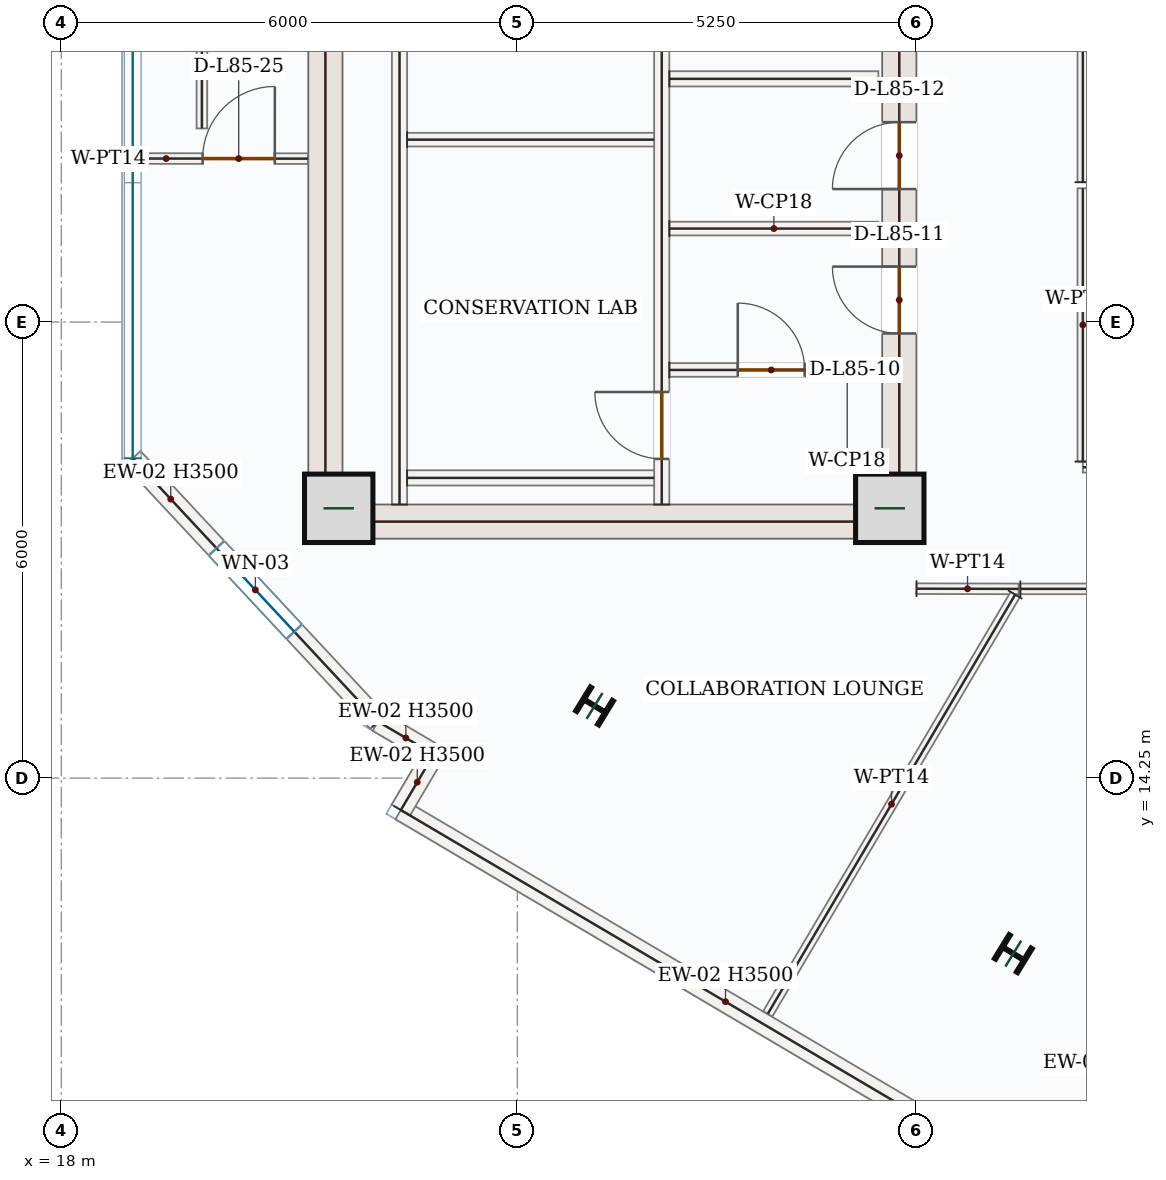
"""IFC4 building model, lengths in metres.
Left out: names, types, materials, properties, quantities, classifications, styles, units other than length and angle.
Written with IfcOpenShell. Run it as: python <this file> out.ifc"""

import sys

from ifc_helpers import new_model, si_unit, direction, frame, frame_2d, origin, origin_2d, place, context, subcontext, project, spatial, rectangle, i_section, extrude, source, transform, mapped, element, fill, save


model = new_model("IFC4")
c1 = context("Model", 3, precision=1e-05, world=origin(), true_north=direction((0.0, 1.0)))
c2 = subcontext(c1, "Body", "Model", "MODEL_VIEW")
j1 = project(units=[si_unit("LENGTHUNIT", "METRE"), si_unit("PLANEANGLEUNIT", "RADIAN")], contexts=[c1])
p1 = place(None, origin())
s1 = spatial("IfcSite", under=j1, at=p1, CompositionType="ELEMENT")
p2 = place(p1, origin())
s2 = spatial("IfcBuilding", under=s1, at=p2, CompositionType="ELEMENT")
p3 = place(p2, frame((0.0, 0.0, 349.8)))
s3 = spatial("IfcBuildingStorey", under=s2, at=p3, CompositionType="ELEMENT", Elevation=349.8)
m1 = source(origin(), c2, "Body", "SweptSolid", [
    extrude(rectangle(XDim=8.55, YDim=0.45, at=frame_2d((4.275, 0.0))), origin(), (0.0, 0.0, 1.0), 3.5),
])
p4 = place(p3, frame((21.475, 17.4, 0.0), z_axis=(0.0, 0.0, 1.0), x_axis=(0.0, 1.0, 0.0)))
e1 = element("IfcWall", 1, at=p4, inside=s3, PredefinedType="SHEAR", context=c2, shape_type="MappedRepresentation", body=[
    mapped(m1, transform((0.0, 0.0, 0.0), x_axis=(1.0, 0.0, 0.0), y_axis=(0.0, 1.0, 0.0), z_axis=(0.0, 0.0, 1.0), scale=1.0)),
])
p5 = place(p3, frame((29.025, 17.4, 0.0), z_axis=(0.0, 0.0, 1.0), x_axis=(0.0, 1.0, 0.0)))
e2 = element("IfcWall", 2, at=p5, inside=s3, PredefinedType="SHEAR", context=c2, shape_type="SweptSolid", body=[
    extrude(rectangle(XDim=8.55, YDim=0.45, at=frame_2d((4.275, 0.0))), origin(), (0.0, 0.0, 1.0), 3.5),
])
p6 = place(p5, frame((6.65, 0.0, 0.0)))
e3 = element("IfcOpeningElement", 3, at=p6, cuts=e2, PredefinedType="OPENING", context=c2, shape_type="SweptSolid", body=[
    extrude(rectangle(XDim=1.1, YDim=2.2, at=frame_2d((0.55, 1.1))), frame((0.0, 0.235, 0.0), z_axis=(0.0, -1.0, 0.0), x_axis=(1.0, 0.0, 0.0)), (0.0, 0.0, 1.0), 0.47),
])
p7 = place(p5, frame((2.7, 0.0, 0.0)))
e4 = element("IfcOpeningElement", 4, at=p7, cuts=e2, PredefinedType="OPENING", context=c2, shape_type="SweptSolid", body=[
    extrude(rectangle(XDim=0.88, YDim=2.1, at=frame_2d((0.44, 1.05))), frame((0.0, 0.235, 0.0), z_axis=(0.0, -1.0, 0.0), x_axis=(1.0, 0.0, 0.0)), (0.0, 0.0, 1.0), 0.47),
])
p8 = place(p5, frame((4.6, 0.0, 0.0)))
e5 = element("IfcOpeningElement", 5, at=p8, cuts=e2, PredefinedType="OPENING", context=c2, shape_type="SweptSolid", body=[
    extrude(rectangle(XDim=0.88, YDim=2.1, at=frame_2d((0.44, 1.05))), frame((0.0, 0.235, 0.0), z_axis=(0.0, -1.0, 0.0), x_axis=(1.0, 0.0, 0.0)), (0.0, 0.0, 1.0), 0.47),
])
m2 = source(origin(), c2, "Body", "SweptSolid", [
    extrude(rectangle(XDim=7.1, YDim=0.45, at=frame_2d((3.55, 0.0))), origin(), (0.0, 0.0, 1.0), 3.5),
])
p9 = place(p3, frame((21.7, 17.625, 0.0), z_axis=(0.0, 0.0, 1.0), x_axis=(1.0, 0.0, 0.0)))
e6 = element("IfcWall", 6, at=p9, inside=s3, PredefinedType="SHEAR", context=c2, shape_type="MappedRepresentation", body=[
    mapped(m2, transform((0.0, 0.0, 0.0), x_axis=(1.0, 0.0, 0.0), y_axis=(0.0, 1.0, 0.0), z_axis=(0.0, 0.0, 1.0), scale=1.0)),
])
m3 = source(origin(), c2, "Body", "SweptSolid", [
    extrude(rectangle(XDim=0.9, YDim=0.9, at=origin_2d()), origin(), (0.0, 0.0, 1.0), 3.75),
])
for number, where, z_axis, x_axis in (
    (7, (21.65, 17.8, 0.0), (0.0, 0.0, 1.0), (1.0, 0.0, 0.0)),
    (8, (28.9, 17.8, 0.0), (0.0, 0.0, 1.0), (1.0, 0.0, 0.0)),
):
    element("IfcColumn", number, at=place(p3, frame(where, z_axis=z_axis, x_axis=x_axis)), inside=s3, PredefinedType="COLUMN", context=c2, shape_type="MappedRepresentation", body=[
        mapped(m3, transform((0.0, 0.0, 0.0), x_axis=(1.0, 0.0, 0.0), y_axis=(0.0, 1.0, 0.0), z_axis=(0.0, 0.0, 1.0), scale=1.0)),
    ])
m4 = source(origin(), c2, "Body", "SweptSolid", [
    extrude(i_section(OverallWidth=0.369, OverallDepth=0.356, WebThickness=0.011, FlangeThickness=0.018, FilletRadius=0.018, at=origin_2d()), origin(), (0.0, 0.0, 1.0), 3.75),
])
for number, where, z_axis, x_axis in (
    (9, (25.016, 15.2, 0.0), (0.0, 0.0, 1.0), (0.522, 0.853, 0.0)),
    (10, (30.525, 11.942, 0.0), (0.0, 0.0, 1.0), (0.522, 0.853, 0.0)),
):
    element("IfcColumn", number, at=place(p3, frame(where, z_axis=z_axis, x_axis=x_axis)), inside=s3, PredefinedType="COLUMN", context=c2, shape_type="MappedRepresentation", body=[
        mapped(m4, transform((0.0, 0.0, 0.0), x_axis=(1.0, 0.0, 0.0), y_axis=(0.0, 1.0, 0.0), z_axis=(0.0, 0.0, 1.0), scale=1.0)),
    ])
m5 = source(origin(), c2, "Body", "SweptSolid", [
    extrude(rectangle(XDim=9.92, YDim=0.28, at=frame_2d((4.96, 0.0))), origin(), (0.0, 0.0, 1.0), 3.5),
])
p10 = place(p3, frame((31.01, 8.788, 0.0), z_axis=(0.0, 0.0, 1.0), x_axis=(-0.861192451778, 0.508279018848, 0.0)))
e11 = element("IfcWall", 11, at=p10, inside=s3, PredefinedType="SOLIDWALL", context=c2, shape_type="MappedRepresentation", body=[
    mapped(m5, transform((0.0, 0.0, 0.0), x_axis=(1.0, 0.0, 0.0), y_axis=(0.0, 1.0, 0.0), z_axis=(0.0, 0.0, 1.0), scale=1.0)),
])
m6 = source(origin(), c2, "Body", "SweptSolid", [
    extrude(rectangle(XDim=0.85, YDim=0.28, at=frame_2d((0.425, 0.0))), origin(), (0.0, 0.0, 1.0), 3.5),
])
for number, where, z_axis, x_axis in (
    (12, (22.467, 13.83, 0.0), (0.0, 0.0, 1.0), (0.508, 0.861, 0.0)),
    (13, (22.899, 14.562, 0.0), (0.0, 0.0, 1.0), (-0.861, 0.508, 0.0)),
):
    element("IfcWall", number, at=place(p3, frame(where, z_axis=z_axis, x_axis=x_axis)), inside=s3, PredefinedType="SOLIDWALL", context=c2, shape_type="MappedRepresentation", body=[
        mapped(m6, transform((0.0, 0.0, 0.0), x_axis=(1.0, 0.0, 0.0), y_axis=(0.0, 1.0, 0.0), z_axis=(0.0, 0.0, 1.0), scale=1.0)),
    ])
p11 = place(p3, frame((22.167, 14.994, 0.0), z_axis=(0.0, 0.0, 1.0), x_axis=(-0.681733754317, 0.731600361006, 0.0)))
e14 = element("IfcWall", 14, at=p11, inside=s3, PredefinedType="SOLIDWALL", context=c2, shape_type="SweptSolid", body=[
    extrude(rectangle(XDim=4.734, YDim=0.28, at=frame_2d((2.367, 0.0))), origin(), (0.0, 0.0, 1.0), 3.5),
])
p12 = place(p11, frame((1.617, 0.0, 0.85)))
e15 = element("IfcOpeningElement", 15, at=p12, cuts=e14, PredefinedType="OPENING", context=c2, shape_type="SweptSolid", body=[
    extrude(rectangle(XDim=1.5, YDim=1.5, at=frame_2d((0.75, 0.75))), frame((0.0, 0.15, 0.0), z_axis=(0.0, -1.0, 0.0), x_axis=(1.0, 0.0, 0.0)), (0.0, 0.0, 1.0), 0.3),
])
m7 = source(origin(), c2, "Body", "SweptSolid", [
    extrude(rectangle(XDim=7.87, YDim=0.2, at=frame_2d((3.935, 0.0))), origin(), (0.0, 0.0, 1.0), 3.5),
])
p13 = place(p3, frame((22.45, 17.85, 0.0), z_axis=(0.0, 0.0, 1.0), x_axis=(0.0, 1.0, 0.0)))
e16 = element("IfcWall", 16, at=p13, inside=s3, PredefinedType="SOLIDWALL", context=c2, shape_type="MappedRepresentation", body=[
    mapped(m7, transform((0.0, 0.0, 0.0), x_axis=(1.0, 0.0, 0.0), y_axis=(0.0, 1.0, 0.0), z_axis=(0.0, 0.0, 1.0), scale=1.0)),
])
p14 = place(p3, frame((25.9, 17.85, 0.0), z_axis=(0.0, 0.0, 1.0), x_axis=(0.0, 1.0, 0.0)))
e17 = element("IfcWall", 17, at=p14, inside=s3, PredefinedType="SOLIDWALL", context=c2, shape_type="SweptSolid", body=[
    extrude(rectangle(XDim=8.0, YDim=0.2, at=frame_2d((4.0, 0.0))), origin(), (0.0, 0.0, 1.0), 3.5),
])
p15 = place(p14, frame((6.2, 0.0, 0.0)))
e18 = element("IfcOpeningElement", 18, at=p15, cuts=e17, PredefinedType="OPENING", context=c2, shape_type="SweptSolid", body=[
    extrude(rectangle(XDim=1.0, YDim=2.15, at=frame_2d((0.5, 1.075))), frame((0.0, 0.11, 0.0), z_axis=(0.0, -1.0, 0.0), x_axis=(1.0, 0.0, 0.0)), (0.0, 0.0, 1.0), 0.22),
])
p16 = place(p14, frame((0.6, 0.0, 0.0)))
e19 = element("IfcOpeningElement", 19, at=p16, cuts=e17, PredefinedType="OPENING", context=c2, shape_type="SweptSolid", body=[
    extrude(rectangle(XDim=0.88, YDim=2.1, at=frame_2d((0.44, 1.05))), frame((0.0, 0.11, 0.0), z_axis=(0.0, -1.0, 0.0), x_axis=(1.0, 0.0, 0.0)), (0.0, 0.0, 1.0), 0.22),
])
m8 = source(origin(), c2, "Body", "SweptSolid", [
    extrude(rectangle(XDim=3.25, YDim=0.2, at=frame_2d((1.625, 0.0))), origin(), (0.0, 0.0, 1.0), 3.5),
])
p17 = place(p3, frame((22.55, 18.2, 0.0), z_axis=(0.0, 0.0, 1.0), x_axis=(1.0, 0.0, 0.0)))
e20 = element("IfcWall", 20, at=p17, inside=s3, PredefinedType="SOLIDWALL", context=c2, shape_type="MappedRepresentation", body=[
    mapped(m8, transform((0.0, 0.0, 0.0), x_axis=(1.0, 0.0, 0.0), y_axis=(0.0, 1.0, 0.0), z_axis=(0.0, 0.0, 1.0), scale=1.0)),
])
m9 = source(origin(), c2, "Body", "SweptSolid", [
    extrude(rectangle(XDim=3.25, YDim=0.18, at=frame_2d((1.625, 0.0))), origin(), (0.0, 0.0, 1.0), 3.5),
])
p18 = place(p3, frame((22.55, 22.65, 0.0), z_axis=(0.0, 0.0, 1.0), x_axis=(1.0, 0.0, 0.0)))
e21 = element("IfcWall", 21, at=p18, inside=s3, PredefinedType="PARTITIONING", context=c2, shape_type="MappedRepresentation", body=[
    mapped(m9, transform((0.0, 0.0, 0.0), x_axis=(1.0, 0.0, 0.0), y_axis=(0.0, 1.0, 0.0), z_axis=(0.0, 0.0, 1.0), scale=1.0)),
])
m10 = source(origin(), c2, "Body", "SweptSolid", [
    extrude(rectangle(XDim=2.75, YDim=0.2, at=frame_2d((1.375, 0.0))), origin(), (0.0, 0.0, 1.0), 3.5),
])
p19 = place(p3, frame((26.0, 23.45, 0.0), z_axis=(0.0, 0.0, 1.0), x_axis=(1.0, 0.0, 0.0)))
e22 = element("IfcWall", 22, at=p19, inside=s3, PredefinedType="SOLIDWALL", context=c2, shape_type="MappedRepresentation", body=[
    mapped(m10, transform((0.0, 0.0, 0.0), x_axis=(1.0, 0.0, 0.0), y_axis=(0.0, 1.0, 0.0), z_axis=(0.0, 0.0, 1.0), scale=1.0)),
])
p20 = place(p3, frame((26.0, 19.62, 0.0), z_axis=(0.0, 0.0, 1.0), x_axis=(1.0, 0.0, 0.0)))
e23 = element("IfcWall", 23, at=p20, inside=s3, PredefinedType="PARTITIONING", context=c2, shape_type="SweptSolid", body=[
    extrude(rectangle(XDim=2.75, YDim=0.18, at=frame_2d((1.375, 0.0))), origin(), (0.0, 0.0, 1.0), 3.5),
])
p21 = place(p20, frame((0.9, 0.0, 0.0)))
e24 = element("IfcOpeningElement", 24, at=p21, cuts=e23, PredefinedType="OPENING", context=c2, shape_type="SweptSolid", body=[
    extrude(rectangle(XDim=0.88, YDim=2.1, at=frame_2d((0.44, 1.05))), frame((0.0, 0.1, 0.0), z_axis=(0.0, -1.0, 0.0), x_axis=(1.0, 0.0, 0.0)), (0.0, 0.0, 1.0), 0.2),
])
m11 = source(origin(), c2, "Body", "SweptSolid", [
    extrude(rectangle(XDim=2.75, YDim=0.18, at=frame_2d((1.375, 0.0))), origin(), (0.0, 0.0, 1.0), 3.5),
])
p22 = place(p3, frame((26.0, 21.48, 0.0), z_axis=(0.0, 0.0, 1.0), x_axis=(1.0, 0.0, 0.0)))
e25 = element("IfcWall", 25, at=p22, inside=s3, PredefinedType="PARTITIONING", context=c2, shape_type="MappedRepresentation", body=[
    mapped(m11, transform((0.0, 0.0, 0.0), x_axis=(1.0, 0.0, 0.0), y_axis=(0.0, 1.0, 0.0), z_axis=(0.0, 0.0, 1.0), scale=1.0)),
])
p23 = place(p3, frame((35.91, 18.34, 0.0), z_axis=(0.0, 0.0, 1.0), x_axis=(-1.0, 0.0, 0.0)))
e26 = element("IfcWall", 26, at=p23, inside=s3, PredefinedType="PARTITIONING", context=c2, shape_type="SweptSolid", body=[
    extrude(rectangle(XDim=4.47, YDim=0.14, at=frame_2d((2.235, 0.0))), origin(), (0.0, 0.0, 1.0), 3.5),
])
p24 = place(p23, frame((0.774, 0.0, 0.0)))
e27 = element("IfcOpeningElement", 27, at=p24, cuts=e26, PredefinedType="OPENING", context=c2, shape_type="SweptSolid", body=[
    extrude(rectangle(XDim=0.95, YDim=2.15, at=frame_2d((0.475, 1.075))), frame((0.0, 0.08, 0.0), z_axis=(0.0, -1.0, 0.0), x_axis=(1.0, 0.0, 0.0)), (0.0, 0.0, 1.0), 0.16),
])
m12 = source(origin(), c2, "Body", "SweptSolid", [
    extrude(rectangle(XDim=3.595, YDim=0.14, at=frame_2d((1.797, 0.0))), origin(), (0.0, 0.0, 1.0), 3.5),
])
p25 = place(p3, frame((31.44, 18.415, 0.0), z_axis=(0.0, 0.0, 1.0), x_axis=(0.0, 1.0, 0.0)))
e28 = element("IfcWall", 28, at=p25, inside=s3, PredefinedType="PARTITIONING", context=c2, shape_type="MappedRepresentation", body=[
    mapped(m12, transform((0.0, 0.0, 0.0), x_axis=(1.0, 0.0, 0.0), y_axis=(0.0, 1.0, 0.0), z_axis=(0.0, 0.0, 1.0), scale=1.0)),
])
m13 = source(origin(), c2, "Body", "SweptSolid", [
    extrude(rectangle(XDim=3.72, YDim=0.14, at=frame_2d((1.86, 0.0))), origin(), (0.0, 0.0, 1.0), 3.5),
])
p26 = place(p3, frame((31.44, 22.09, 0.0), z_axis=(0.0, 0.0, 1.0), x_axis=(0.0, 1.0, 0.0)))
e29 = element("IfcWall", 29, at=p26, inside=s3, PredefinedType="PARTITIONING", context=c2, shape_type="MappedRepresentation", body=[
    mapped(m13, transform((0.0, 0.0, 0.0), x_axis=(1.0, 0.0, 0.0), y_axis=(0.0, 1.0, 0.0), z_axis=(0.0, 0.0, 1.0), scale=1.0)),
])
p27 = place(p3, frame((19.05, 22.402, 0.0), z_axis=(0.0, 0.0, 1.0), x_axis=(0.999999696925, -0.000778556098, 0.0)))
e30 = element("IfcWall", 30, at=p27, inside=s3, PredefinedType="PARTITIONING", context=c2, shape_type="SweptSolid", body=[
    extrude(rectangle(XDim=2.195, YDim=0.14, at=frame_2d((1.098, 0.0))), origin(), (0.0, 0.0, 1.0), 3.5),
])
p28 = place(p27, frame((0.809, 0.0, 0.0)))
e31 = element("IfcOpeningElement", 31, at=p28, cuts=e30, PredefinedType="OPENING", context=c2, shape_type="SweptSolid", body=[
    extrude(rectangle(XDim=0.95, YDim=2.15, at=frame_2d((0.475, 1.075))), frame((0.0, 0.08, 0.0), z_axis=(0.0, -1.0, 0.0), x_axis=(1.0, 0.0, 0.0)), (0.0, 0.0, 1.0), 0.16),
])
m14 = source(origin(), c2, "Body", "SweptSolid", [
    extrude(rectangle(XDim=1.343, YDim=0.14, at=frame_2d((0.671, 0.0))), origin(), (0.0, 0.0, 1.0), 3.5),
])
p29 = place(p3, frame((29.252, 16.743, 0.0), z_axis=(0.0, 0.0, 1.0), x_axis=(0.999997619843, -0.002181812989, 0.0)))
e32 = element("IfcWall", 32, at=p29, inside=s3, PredefinedType="PARTITIONING", context=c2, shape_type="MappedRepresentation", body=[
    mapped(m14, transform((0.0, 0.0, 0.0), x_axis=(1.0, 0.0, 0.0), y_axis=(0.0, 1.0, 0.0), z_axis=(0.0, 0.0, 1.0), scale=1.0)),
])
m15 = source(origin(), c2, "Body", "SweptSolid", [
    extrude(rectangle(XDim=6.405, YDim=0.14, at=frame_2d((3.202, 0.0))), origin(), (0.0, 0.0, 1.0), 3.5),
])
p30 = place(p3, frame((30.55, 16.665, 0.0), z_axis=(0.0, 0.0, 1.0), x_axis=(-0.508299006291, -0.861180654801, 0.0)))
e33 = element("IfcWall", 33, at=p30, inside=s3, PredefinedType="PARTITIONING", context=c2, shape_type="MappedRepresentation", body=[
    mapped(m15, transform((0.0, 0.0, 0.0), x_axis=(1.0, 0.0, 0.0), y_axis=(0.0, 1.0, 0.0), z_axis=(0.0, 0.0, 1.0), scale=1.0)),
])
p31 = place(p3, frame((30.618, 16.74, 0.0), z_axis=(0.0, 0.0, 1.0), x_axis=(1.0, 0.0, 0.0)))
e34 = element("IfcWall", 34, at=p31, inside=s3, PredefinedType="PARTITIONING", context=c2, shape_type="SweptSolid", body=[
    extrude(rectangle(XDim=8.014, YDim=0.14, at=frame_2d((4.007, 0.0))), origin(), (0.0, 0.0, 1.0), 3.5),
])
p32 = place(p31, frame((4.592, 0.0, 0.0)))
e35 = element("IfcOpeningElement", 35, at=p32, cuts=e34, PredefinedType="OPENING", context=c2, shape_type="SweptSolid", body=[
    extrude(rectangle(XDim=0.95, YDim=2.15, at=frame_2d((0.475, 1.075))), frame((0.0, 0.08, 0.0), z_axis=(0.0, -1.0, 0.0), x_axis=(1.0, 0.0, 0.0)), (0.0, 0.0, 1.0), 0.16),
])
p33 = place(p3, frame((19.853, 31.598, 0.0), z_axis=(0.0, 0.0, 1.0), x_axis=(-0.00027740789, -0.999999961522, 0.0)))
e36 = element("IfcWall", 36, at=p33, inside=s3, PredefinedType="PARTITIONING", context=c2, shape_type="SweptSolid", body=[
    extrude(rectangle(XDim=8.801, YDim=0.14, at=frame_2d((4.4, 0.0))), origin(), (0.0, 0.0, 1.0), 3.5),
])
p34 = place(p33, frame((5.103, 0.0, 0.0)))
e37 = element("IfcOpeningElement", 37, at=p34, cuts=e36, PredefinedType="OPENING", context=c2, shape_type="SweptSolid", body=[
    extrude(rectangle(XDim=0.95, YDim=2.15, at=frame_2d((0.475, 1.075))), frame((0.0, 0.08, 0.0), z_axis=(0.0, -1.0, 0.0), x_axis=(1.0, 0.0, 0.0)), (0.0, 0.0, 1.0), 0.16),
])
m16 = source(origin(), c2, "Body", "SweptSolid", [
    extrude(rectangle(XDim=1.5, YDim=1.5, at=frame_2d((0.75, 0.75))), frame((0.0, 0.03, 0.0), z_axis=(0.0, -1.0, 0.0), x_axis=(1.0, 0.0, 0.0)), (0.0, 0.0, 1.0), 0.06),
])
p35 = place(p12, origin())
e38 = element("IfcWindow", 38, at=p35, inside=s3, PartitioningType="SINGLE_PANEL", PredefinedType="WINDOW", context=c2, shape_type="MappedRepresentation", body=[
    mapped(m16, transform((0.0, 0.0, 0.0), x_axis=(1.0, 0.0, 0.0), y_axis=(0.0, 1.0, 0.0), z_axis=(0.0, 0.0, 1.0), scale=1.0)),
])
fill(e15, e38)
m17 = source(origin(), c2, "Body", "SweptSolid", [
    extrude(rectangle(XDim=0.88, YDim=2.1, at=frame_2d((0.44, 1.05))), frame((0.0, 0.025, 0.0), z_axis=(0.0, -1.0, 0.0), x_axis=(1.0, 0.0, 0.0)), (0.0, 0.0, 1.0), 0.05),
])
p36 = place(p16, origin())
e39 = element("IfcDoor", 39, at=p36, inside=s3, OperationType="SINGLE_SWING_RIGHT", PredefinedType="DOOR", context=c2, shape_type="MappedRepresentation", body=[
    mapped(m17, transform((0.0, 0.0, 0.0), x_axis=(1.0, 0.0, 0.0), y_axis=(0.0, 1.0, 0.0), z_axis=(0.0, 0.0, 1.0), scale=1.0)),
])
fill(e19, e39)
p37 = place(p21, origin())
e40 = element("IfcDoor", 40, at=p37, inside=s3, OperationType="SINGLE_SWING_LEFT", PredefinedType="DOOR", context=c2, shape_type="MappedRepresentation", body=[
    mapped(m17, transform((0.0, 0.0, 0.0), x_axis=(1.0, 0.0, 0.0), y_axis=(0.0, 1.0, 0.0), z_axis=(0.0, 0.0, 1.0), scale=1.0)),
])
fill(e24, e40)
p38 = place(p7, origin())
e41 = element("IfcDoor", 41, at=p38, inside=s3, OperationType="SINGLE_SWING_RIGHT", PredefinedType="DOOR", context=c2, shape_type="MappedRepresentation", body=[
    mapped(m17, transform((0.0, 0.0, 0.0), x_axis=(1.0, 0.0, 0.0), y_axis=(0.0, 1.0, 0.0), z_axis=(0.0, 0.0, 1.0), scale=1.0)),
])
fill(e4, e41)
p39 = place(p8, origin())
e42 = element("IfcDoor", 42, at=p39, inside=s3, OperationType="SINGLE_SWING_LEFT", PredefinedType="DOOR", context=c2, shape_type="MappedRepresentation", body=[
    mapped(m17, transform((0.0, 0.0, 0.0), x_axis=(1.0, 0.0, 0.0), y_axis=(0.0, 1.0, 0.0), z_axis=(0.0, 0.0, 1.0), scale=1.0)),
])
fill(e5, e42)
m18 = source(origin(), c2, "Body", "SweptSolid", [
    extrude(rectangle(XDim=0.95, YDim=2.15, at=frame_2d((0.475, 1.075))), frame((0.0, 0.025, 0.0), z_axis=(0.0, -1.0, 0.0), x_axis=(1.0, 0.0, 0.0)), (0.0, 0.0, 1.0), 0.05),
])
p40 = place(p28, origin())
e43 = element("IfcDoor", 43, at=p40, inside=s3, OperationType="SINGLE_SWING_RIGHT", PredefinedType="DOOR", context=c2, shape_type="MappedRepresentation", body=[
    mapped(m18, transform((0.0, 0.0, 0.0), x_axis=(1.0, 0.0, 0.0), y_axis=(0.0, 1.0, 0.0), z_axis=(0.0, 0.0, 1.0), scale=1.0)),
])
fill(e31, e43)
save(model, sys.argv[1])
